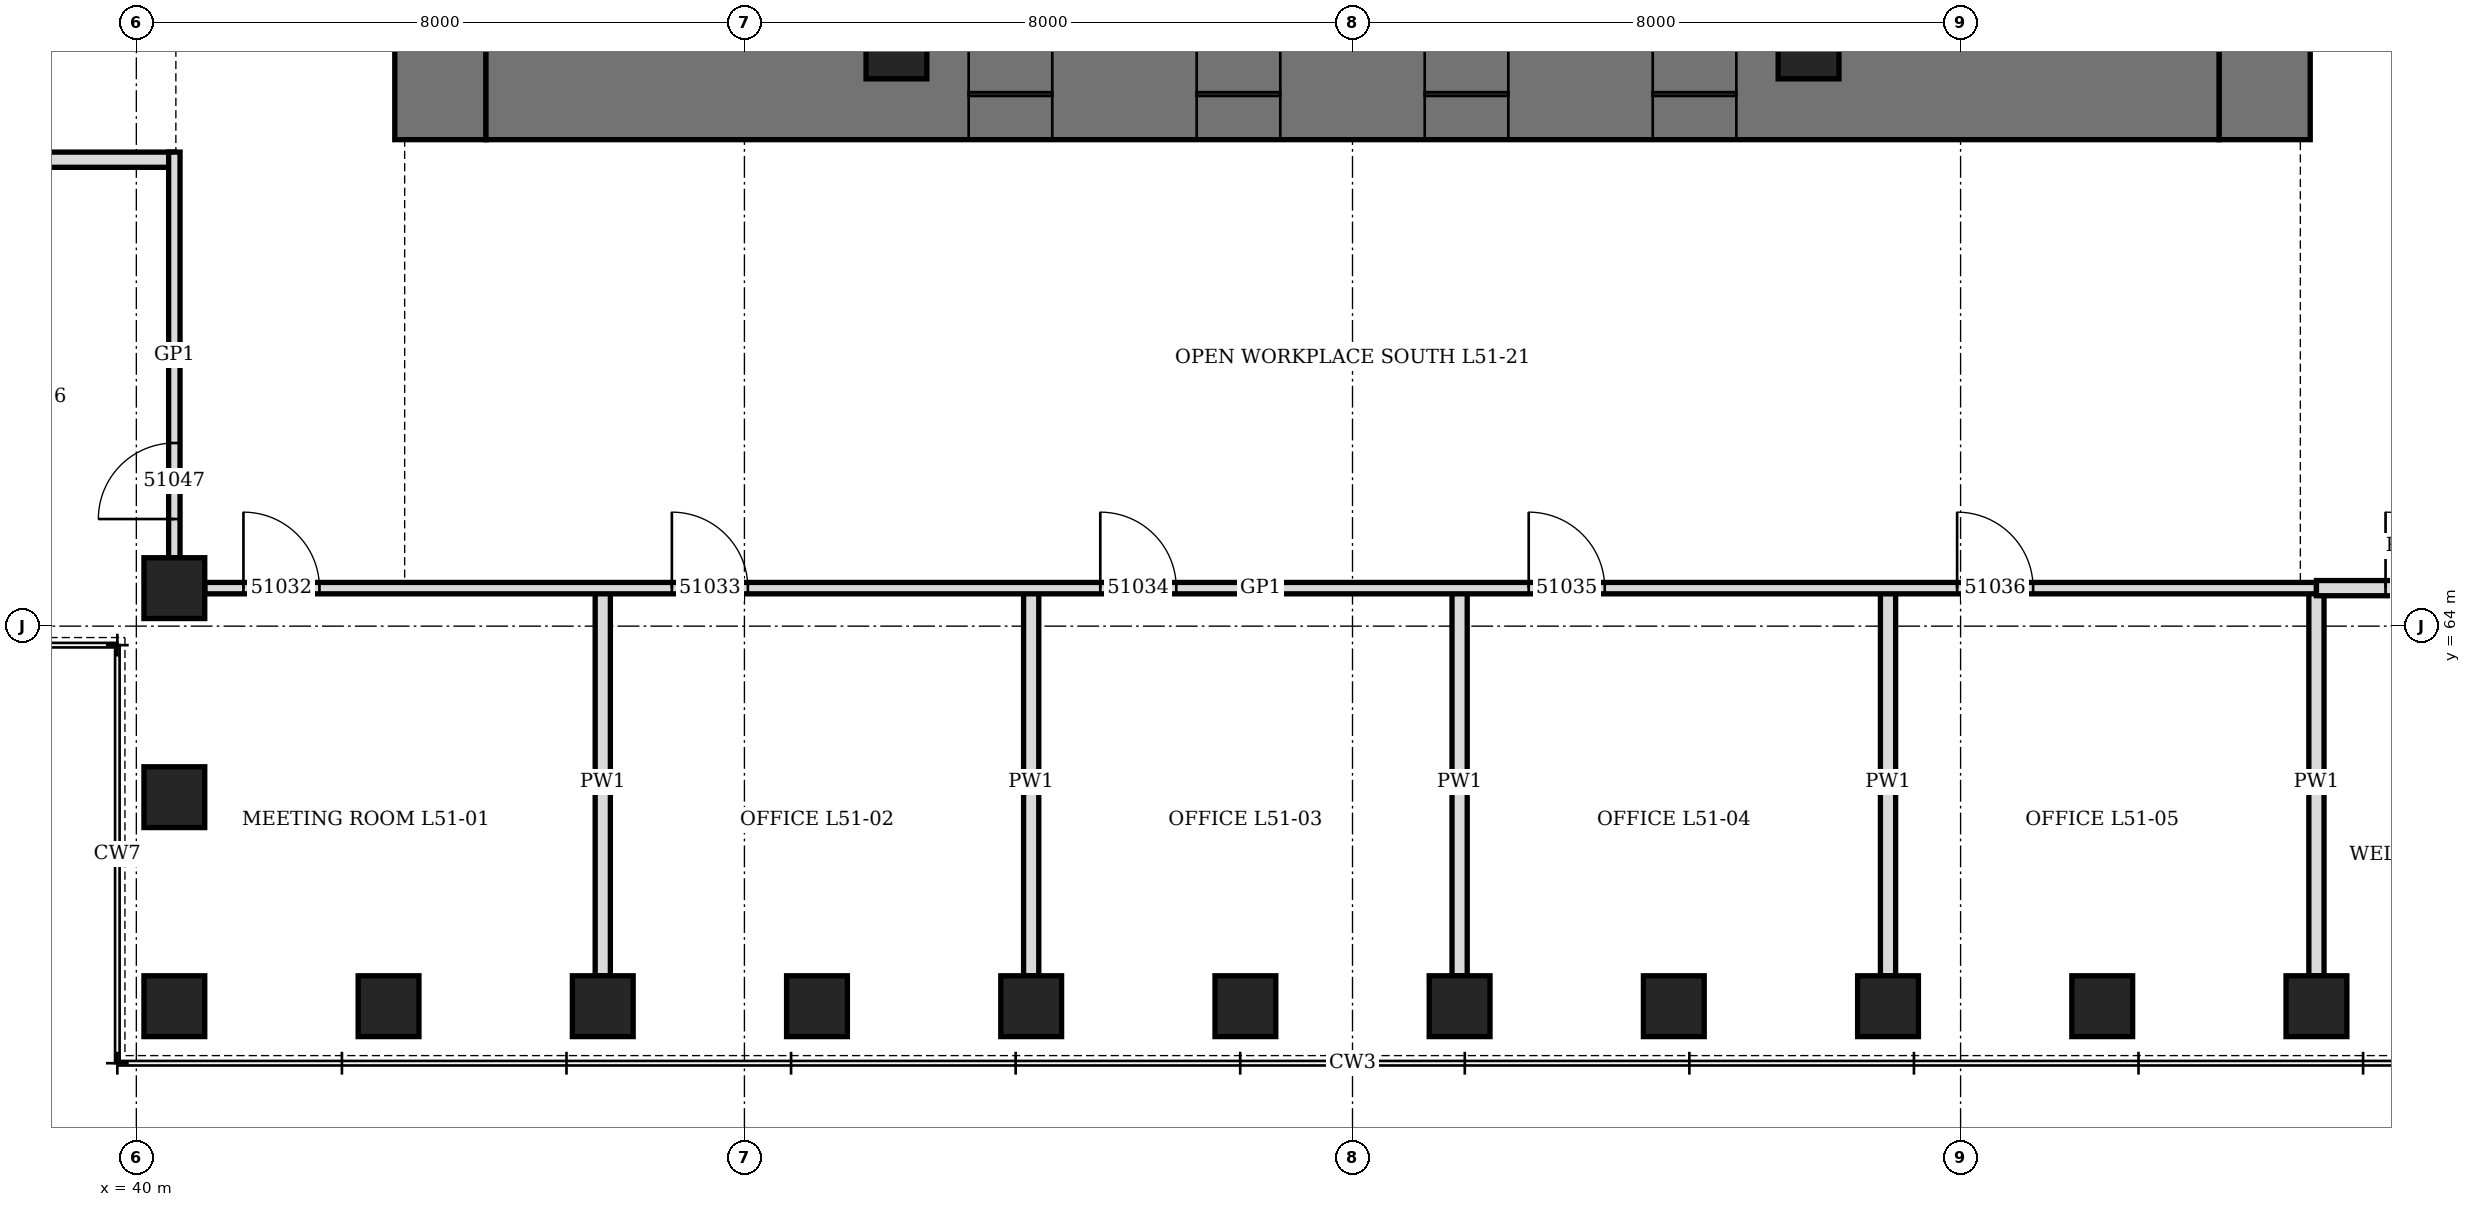
"""IFC4 building model, lengths in metres.
Left out: names, types, materials, properties, quantities, classifications, styles, units other than length and angle.
Written with IfcOpenShell. Run it as: python <this file> out.ifc"""

import sys

from ifc_helpers import new_model, si_unit, direction, frame, frame_2d, origin, origin_2d, place, context, subcontext, project, spatial, rectangle, hollow_rectangle, extrude, element, fill, save


model = new_model("IFC4")
c1 = context("Model", 3, precision=1e-05, world=origin(), true_north=direction((0.0, 1.0)))
c2 = subcontext(c1, "Body", "Model", "MODEL_VIEW")
j1 = project(units=[si_unit("LENGTHUNIT", "METRE"), si_unit("PLANEANGLEUNIT", "RADIAN")], contexts=[c1])
p1 = place(None, origin())
s1 = spatial("IfcSite", under=j1, at=p1, CompositionType="ELEMENT")
p2 = place(p1, origin())
s2 = spatial("IfcBuilding", under=s1, at=p2, CompositionType="ELEMENT")
p3 = place(p2, frame((0.0, 0.0, 227.5)))
s3 = spatial("IfcBuildingStorey", under=s2, at=p3, CompositionType="ELEMENT", Elevation=227.5)
for number, where, z_axis, x_axis in (
    (1, (40.5, 59.0, 0.0), (0.0, 0.0, 1.0), (1.0, 0.0, 0.0)),
    (2, (43.318, 59.0, 0.0), (0.0, 0.0, 1.0), (1.0, 0.0, 0.0)),
    (3, (46.136, 59.0, 0.0), (0.0, 0.0, 1.0), (1.0, 0.0, 0.0)),
    (4, (48.955, 59.0, 0.0), (0.0, 0.0, 1.0), (1.0, 0.0, 0.0)),
    (5, (51.773, 59.0, 0.0), (0.0, 0.0, 1.0), (1.0, 0.0, 0.0)),
    (6, (54.591, 59.0, 0.0), (0.0, 0.0, 1.0), (1.0, 0.0, 0.0)),
    (7, (57.409, 59.0, 0.0), (0.0, 0.0, 1.0), (1.0, 0.0, 0.0)),
    (8, (60.227, 59.0, 0.0), (0.0, 0.0, 1.0), (1.0, 0.0, 0.0)),
    (9, (63.045, 59.0, 0.0), (0.0, 0.0, 1.0), (1.0, 0.0, 0.0)),
    (10, (65.864, 59.0, 0.0), (0.0, 0.0, 1.0), (1.0, 0.0, 0.0)),
    (11, (68.682, 59.0, 0.0), (0.0, 0.0, 1.0), (1.0, 0.0, 0.0)),
    (12, (40.5, 64.5, 0.0), (0.0, 0.0, 1.0), (0.0, 1.0, 0.0)),
    (13, (40.5, 61.75, 0.0), (0.0, 0.0, 1.0), (0.0, 1.0, 0.0)),
):
    element("IfcColumn", number, at=place(p3, frame(where, z_axis=z_axis, x_axis=x_axis)), inside=s3, PredefinedType="COLUMN", context=c2, shape_type="SweptSolid", body=[
        extrude(hollow_rectangle(XDim=0.8, YDim=0.8, WallThickness=0.08, at=origin_2d()), origin(), (0.0, 0.0, 1.0), 4.2),
    ])
p4 = place(p3, frame((44.0, 70.4, 0.0), z_axis=(0.0, 0.0, 1.0), x_axis=(0.0, 1.0, 0.0)))
e14 = element("IfcWall", 14, at=p4, inside=s3, PredefinedType="SHEAR", context=c2, shape_type="SweptSolid", body=[
    extrude(rectangle(XDim=19.2, YDim=1.2, at=frame_2d((9.6, 0.0))), origin(), (0.0, 0.0, 1.0), 4.2),
])
p5 = place(p4, frame((8.6, 0.0, 0.0)))
e15 = element("IfcOpeningElement", 15, at=p5, cuts=e14, PredefinedType="OPENING", context=c2, shape_type="SweptSolid", body=[
    extrude(rectangle(XDim=2.0, YDim=2.4, at=frame_2d((1.0, 1.2))), frame((0.0, 0.61, 0.0), z_axis=(0.0, -1.0, 0.0), x_axis=(1.0, 0.0, 0.0)), (0.0, 0.0, 1.0), 1.22),
])
p6 = place(p3, frame((68.0, 70.4, 0.0), z_axis=(0.0, 0.0, 1.0), x_axis=(0.0, 1.0, 0.0)))
e16 = element("IfcWall", 16, at=p6, inside=s3, PredefinedType="SHEAR", context=c2, shape_type="SweptSolid", body=[
    extrude(rectangle(XDim=19.2, YDim=1.2, at=frame_2d((9.6, 0.0))), origin(), (0.0, 0.0, 1.0), 4.2),
])
p7 = place(p6, frame((8.6, 0.0, 0.0)))
e17 = element("IfcOpeningElement", 17, at=p7, cuts=e16, PredefinedType="OPENING", context=c2, shape_type="SweptSolid", body=[
    extrude(rectangle(XDim=2.0, YDim=2.4, at=frame_2d((1.0, 1.2))), frame((0.0, 0.61, 0.0), z_axis=(0.0, -1.0, 0.0), x_axis=(1.0, 0.0, 0.0)), (0.0, 0.0, 1.0), 1.22),
])
p8 = place(p3, frame((44.6, 71.0, 0.0), z_axis=(0.0, 0.0, 1.0), x_axis=(1.0, 0.0, 0.0)))
e18 = element("IfcWall", 18, at=p8, inside=s3, PredefinedType="SHEAR", context=c2, shape_type="SweptSolid", body=[
    extrude(rectangle(XDim=22.8, YDim=1.2, at=frame_2d((11.4, 0.0))), origin(), (0.0, 0.0, 1.0), 4.2),
])
p9 = place(p8, frame((6.35, 0.0, 0.0)))
e19 = element("IfcOpeningElement", 19, at=p9, cuts=e18, PredefinedType="OPENING", context=c2, shape_type="SweptSolid", body=[
    extrude(rectangle(XDim=1.1, YDim=2.2, at=frame_2d((0.55, 1.1))), frame((0.0, 0.61, 0.0), z_axis=(0.0, -1.0, 0.0), x_axis=(1.0, 0.0, 0.0)), (0.0, 0.0, 1.0), 1.22),
])
p10 = place(p8, frame((9.35, 0.0, 0.0)))
e20 = element("IfcOpeningElement", 20, at=p10, cuts=e18, PredefinedType="OPENING", context=c2, shape_type="SweptSolid", body=[
    extrude(rectangle(XDim=1.1, YDim=2.2, at=frame_2d((0.55, 1.1))), frame((0.0, 0.61, 0.0), z_axis=(0.0, -1.0, 0.0), x_axis=(1.0, 0.0, 0.0)), (0.0, 0.0, 1.0), 1.22),
])
p11 = place(p8, frame((12.35, 0.0, 0.0)))
e21 = element("IfcOpeningElement", 21, at=p11, cuts=e18, PredefinedType="OPENING", context=c2, shape_type="SweptSolid", body=[
    extrude(rectangle(XDim=1.1, YDim=2.2, at=frame_2d((0.55, 1.1))), frame((0.0, 0.61, 0.0), z_axis=(0.0, -1.0, 0.0), x_axis=(1.0, 0.0, 0.0)), (0.0, 0.0, 1.0), 1.22),
])
p12 = place(p8, frame((15.35, 0.0, 0.0)))
e22 = element("IfcOpeningElement", 22, at=p12, cuts=e18, PredefinedType="OPENING", context=c2, shape_type="SweptSolid", body=[
    extrude(rectangle(XDim=1.1, YDim=2.2, at=frame_2d((0.55, 1.1))), frame((0.0, 0.61, 0.0), z_axis=(0.0, -1.0, 0.0), x_axis=(1.0, 0.0, 0.0)), (0.0, 0.0, 1.0), 1.22),
])
for number, where, z_axis, x_axis in (
    (23, (50.0, 71.6, 0.0), (0.0, 0.0, 1.0), (1.0, 0.0, 0.0)),
    (24, (62.0, 71.6, 0.0), (0.0, 0.0, 1.0), (1.0, 0.0, 0.0)),
):
    element("IfcColumn", number, at=place(p3, frame(where, z_axis=z_axis, x_axis=x_axis)), inside=s3, PredefinedType="COLUMN", context=c2, shape_type="SweptSolid", body=[
        extrude(hollow_rectangle(XDim=0.8, YDim=0.8, WallThickness=0.1, at=origin_2d()), origin(), (0.0, 0.0, 1.0), 4.2),
    ])
for number, where, z_axis, x_axis in (
    (25, (46.136, 59.4, 0.0), (0.0, 0.0, 1.0), (0.0, 1.0, 0.0)),
    (26, (51.773, 59.4, 0.0), (0.0, 0.0, 1.0), (0.0, 1.0, 0.0)),
    (27, (57.409, 59.4, 0.0), (0.0, 0.0, 1.0), (0.0, 1.0, 0.0)),
    (28, (63.045, 59.4, 0.0), (0.0, 0.0, 1.0), (0.0, 1.0, 0.0)),
    (29, (68.682, 59.4, 0.0), (0.0, 0.0, 1.0), (0.0, 1.0, 0.0)),
    (30, (35.4, 70.136, 0.0), (0.0, 0.0, 1.0), (1.0, 0.0, 0.0)),
):
    element("IfcWall", number, at=place(p3, frame(where, z_axis=z_axis, x_axis=x_axis)), inside=s3, PredefinedType="PARTITIONING", context=c2, shape_type="SweptSolid", body=[
        extrude(rectangle(XDim=5.1, YDim=0.2, at=frame_2d((2.55, 0.0))), origin(), (0.0, 0.0, 1.0), 3.428),
    ])
p13 = place(p3, frame((40.9, 64.5, 0.0), z_axis=(0.0, 0.0, 1.0), x_axis=(1.0, 0.0, 0.0)))
e31 = element("IfcWall", 31, at=p13, inside=s3, PredefinedType="PARTITIONING", context=c2, shape_type="SweptSolid", body=[
    extrude(rectangle(XDim=27.782, YDim=0.15, at=frame_2d((13.891, 0.0))), origin(), (0.0, 0.0, 1.0), 4.04),
])
p14 = place(p13, frame((0.509, 0.0, 0.0)))
e32 = element("IfcOpeningElement", 32, at=p14, cuts=e31, PredefinedType="OPENING", context=c2, shape_type="SweptSolid", body=[
    extrude(rectangle(XDim=1.0, YDim=2.4, at=frame_2d((0.5, 1.2))), frame((0.0, 0.085, 0.0), z_axis=(0.0, -1.0, 0.0), x_axis=(1.0, 0.0, 0.0)), (0.0, 0.0, 1.0), 0.17),
])
p15 = place(p13, frame((6.146, 0.0, 0.0)))
e33 = element("IfcOpeningElement", 33, at=p15, cuts=e31, PredefinedType="OPENING", context=c2, shape_type="SweptSolid", body=[
    extrude(rectangle(XDim=1.0, YDim=2.1, at=frame_2d((0.5, 1.05))), frame((0.0, 0.085, 0.0), z_axis=(0.0, -1.0, 0.0), x_axis=(1.0, 0.0, 0.0)), (0.0, 0.0, 1.0), 0.17),
])
p16 = place(p13, frame((11.782, 0.0, 0.0)))
e34 = element("IfcOpeningElement", 34, at=p16, cuts=e31, PredefinedType="OPENING", context=c2, shape_type="SweptSolid", body=[
    extrude(rectangle(XDim=1.0, YDim=2.1, at=frame_2d((0.5, 1.05))), frame((0.0, 0.085, 0.0), z_axis=(0.0, -1.0, 0.0), x_axis=(1.0, 0.0, 0.0)), (0.0, 0.0, 1.0), 0.17),
])
p17 = place(p13, frame((17.418, 0.0, 0.0)))
e35 = element("IfcOpeningElement", 35, at=p17, cuts=e31, PredefinedType="OPENING", context=c2, shape_type="SweptSolid", body=[
    extrude(rectangle(XDim=1.0, YDim=2.1, at=frame_2d((0.5, 1.05))), frame((0.0, 0.085, 0.0), z_axis=(0.0, -1.0, 0.0), x_axis=(1.0, 0.0, 0.0)), (0.0, 0.0, 1.0), 0.17),
])
p18 = place(p13, frame((23.054, 0.0, 0.0)))
e36 = element("IfcOpeningElement", 36, at=p18, cuts=e31, PredefinedType="OPENING", context=c2, shape_type="SweptSolid", body=[
    extrude(rectangle(XDim=1.0, YDim=2.1, at=frame_2d((0.5, 1.05))), frame((0.0, 0.085, 0.0), z_axis=(0.0, -1.0, 0.0), x_axis=(1.0, 0.0, 0.0)), (0.0, 0.0, 1.0), 0.17),
])
p19 = place(p3, frame((68.682, 64.5, 0.0), z_axis=(0.0, 0.0, 1.0), x_axis=(1.0, 0.0, 0.0)))
e37 = element("IfcWall", 37, at=p19, inside=s3, PredefinedType="PARTITIONING", context=c2, shape_type="SweptSolid", body=[
    extrude(rectangle(XDim=2.418, YDim=0.2, at=frame_2d((1.209, 0.0))), origin(), (0.0, 0.0, 1.0), 4.04),
])
p20 = place(p19, frame((0.909, 0.0, 0.0)))
e38 = element("IfcOpeningElement", 38, at=p20, cuts=e37, PredefinedType="OPENING", context=c2, shape_type="SweptSolid", body=[
    extrude(rectangle(XDim=1.0, YDim=2.1, at=frame_2d((0.5, 1.05))), frame((0.0, 0.11, 0.0), z_axis=(0.0, -1.0, 0.0), x_axis=(1.0, 0.0, 0.0)), (0.0, 0.0, 1.0), 0.22),
])
p21 = place(p3, frame((40.5, 64.9, 0.0), z_axis=(0.0, 0.0, 1.0), x_axis=(0.0, 1.0, 0.0)))
e39 = element("IfcWall", 39, at=p21, inside=s3, PredefinedType="PARTITIONING", context=c2, shape_type="SweptSolid", body=[
    extrude(rectangle(XDim=5.336, YDim=0.15, at=frame_2d((2.668, 0.0))), origin(), (0.0, 0.0, 1.0), 4.04),
])
p22 = place(p21, frame((0.509, 0.0, 0.0)))
e40 = element("IfcOpeningElement", 40, at=p22, cuts=e39, PredefinedType="OPENING", context=c2, shape_type="SweptSolid", body=[
    extrude(rectangle(XDim=1.0, YDim=2.4, at=frame_2d((0.5, 1.2))), frame((0.0, 0.085, 0.0), z_axis=(0.0, -1.0, 0.0), x_axis=(1.0, 0.0, 0.0)), (0.0, 0.0, 1.0), 0.17),
])
p23 = place(p9, origin())
e41 = element("IfcDoor", 41, at=p23, inside=s3, OperationType="SLIDING_TO_LEFT", PredefinedType="DOOR", context=c2, shape_type="SweptSolid", body=[
    extrude(rectangle(XDim=1.1, YDim=2.2, at=frame_2d((0.55, 1.1))), frame((0.0, 0.35, 0.0), z_axis=(0.0, -1.0, 0.0), x_axis=(1.0, 0.0, 0.0)), (0.0, 0.0, 1.0), 0.7),
])
fill(e19, e41)
p24 = place(p10, origin())
e42 = element("IfcDoor", 42, at=p24, inside=s3, OperationType="SLIDING_TO_LEFT", PredefinedType="DOOR", context=c2, shape_type="SweptSolid", body=[
    extrude(rectangle(XDim=1.1, YDim=2.2, at=frame_2d((0.55, 1.1))), frame((0.0, 0.35, 0.0), z_axis=(0.0, -1.0, 0.0), x_axis=(1.0, 0.0, 0.0)), (0.0, 0.0, 1.0), 0.7),
])
fill(e20, e42)
p25 = place(p11, origin())
e43 = element("IfcDoor", 43, at=p25, inside=s3, OperationType="SLIDING_TO_LEFT", PredefinedType="DOOR", context=c2, shape_type="SweptSolid", body=[
    extrude(rectangle(XDim=1.1, YDim=2.2, at=frame_2d((0.55, 1.1))), frame((0.0, 0.35, 0.0), z_axis=(0.0, -1.0, 0.0), x_axis=(1.0, 0.0, 0.0)), (0.0, 0.0, 1.0), 0.7),
])
fill(e21, e43)
p26 = place(p12, origin())
e44 = element("IfcDoor", 44, at=p26, inside=s3, OperationType="SLIDING_TO_LEFT", PredefinedType="DOOR", context=c2, shape_type="SweptSolid", body=[
    extrude(rectangle(XDim=1.1, YDim=2.2, at=frame_2d((0.55, 1.1))), frame((0.0, 0.35, 0.0), z_axis=(0.0, -1.0, 0.0), x_axis=(1.0, 0.0, 0.0)), (0.0, 0.0, 1.0), 0.7),
])
fill(e22, e44)
p27 = place(p14, origin())
e45 = element("IfcDoor", 45, at=p27, inside=s3, OperationType="SINGLE_SWING_RIGHT", PredefinedType="DOOR", context=c2, shape_type="SweptSolid", body=[
    extrude(rectangle(XDim=1.0, YDim=2.4, at=frame_2d((0.5, 1.2))), frame((0.0, 0.075, 0.0), z_axis=(0.0, -1.0, 0.0), x_axis=(1.0, 0.0, 0.0)), (0.0, 0.0, 1.0), 0.149),
])
fill(e32, e45)
p28 = place(p15, origin())
e46 = element("IfcDoor", 46, at=p28, inside=s3, OperationType="SINGLE_SWING_LEFT", PredefinedType="DOOR", context=c2, shape_type="SweptSolid", body=[
    extrude(rectangle(XDim=1.0, YDim=2.1, at=frame_2d((0.5, 1.05))), frame((0.0, 0.075, 0.0), z_axis=(0.0, -1.0, 0.0), x_axis=(1.0, 0.0, 0.0)), (0.0, 0.0, 1.0), 0.149),
])
fill(e33, e46)
p29 = place(p16, origin())
e47 = element("IfcDoor", 47, at=p29, inside=s3, OperationType="SINGLE_SWING_LEFT", PredefinedType="DOOR", context=c2, shape_type="SweptSolid", body=[
    extrude(rectangle(XDim=1.0, YDim=2.1, at=frame_2d((0.5, 1.05))), frame((0.0, 0.075, 0.0), z_axis=(0.0, -1.0, 0.0), x_axis=(1.0, 0.0, 0.0)), (0.0, 0.0, 1.0), 0.149),
])
fill(e34, e47)
p30 = place(p17, origin())
e48 = element("IfcDoor", 48, at=p30, inside=s3, OperationType="SINGLE_SWING_LEFT", PredefinedType="DOOR", context=c2, shape_type="SweptSolid", body=[
    extrude(rectangle(XDim=1.0, YDim=2.1, at=frame_2d((0.5, 1.05))), frame((0.0, 0.075, 0.0), z_axis=(0.0, -1.0, 0.0), x_axis=(1.0, 0.0, 0.0)), (0.0, 0.0, 1.0), 0.149),
])
fill(e35, e48)
p31 = place(p18, origin())
e49 = element("IfcDoor", 49, at=p31, inside=s3, OperationType="SINGLE_SWING_LEFT", PredefinedType="DOOR", context=c2, shape_type="SweptSolid", body=[
    extrude(rectangle(XDim=1.0, YDim=2.1, at=frame_2d((0.5, 1.05))), frame((0.0, 0.075, 0.0), z_axis=(0.0, -1.0, 0.0), x_axis=(1.0, 0.0, 0.0)), (0.0, 0.0, 1.0), 0.149),
])
fill(e36, e49)
p32 = place(p20, origin())
e50 = element("IfcDoor", 50, at=p32, inside=s3, OperationType="SINGLE_SWING_LEFT", PredefinedType="DOOR", context=c2, shape_type="SweptSolid", body=[
    extrude(rectangle(XDim=1.0, YDim=2.1, at=frame_2d((0.5, 1.05))), frame((0.0, 0.1, 0.0), z_axis=(0.0, -1.0, 0.0), x_axis=(1.0, 0.0, 0.0)), (0.0, 0.0, 1.0), 0.199),
])
fill(e38, e50)
p33 = place(p22, origin())
e51 = element("IfcDoor", 51, at=p33, inside=s3, OperationType="SINGLE_SWING_RIGHT", PredefinedType="DOOR", context=c2, shape_type="SweptSolid", body=[
    extrude(rectangle(XDim=1.0, YDim=2.4, at=frame_2d((0.5, 1.2))), frame((0.0, 0.075, 0.0), z_axis=(0.0, -1.0, 0.0), x_axis=(1.0, 0.0, 0.0)), (0.0, 0.0, 1.0), 0.149),
])
fill(e40, e51)
save(model, sys.argv[1])
